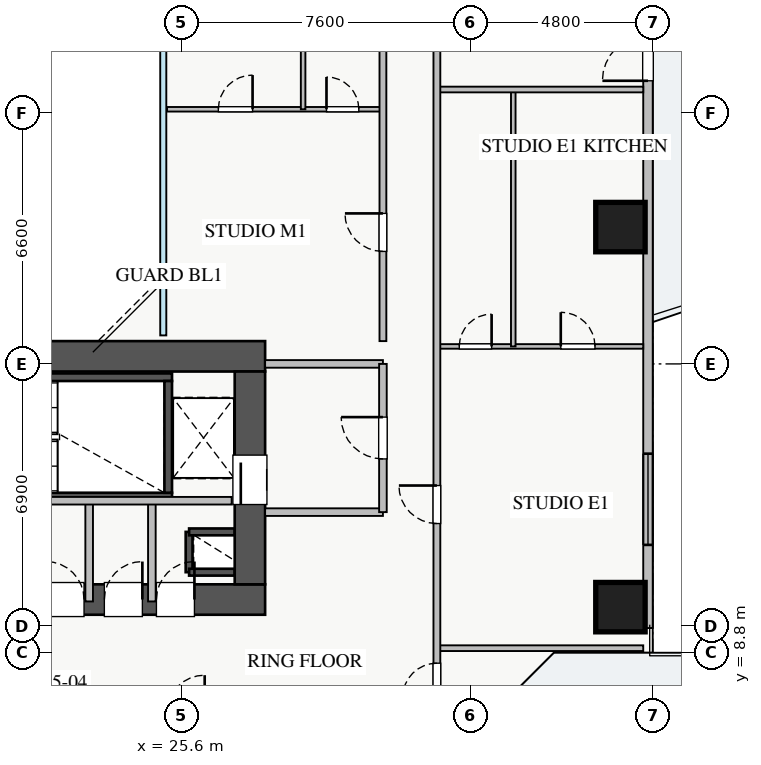
"""IFC4 building model, lengths in metres.
Left out: names, types, materials, properties, quantities, classifications, styles, units other than length and angle.
Written with IfcOpenShell. Run it as: python <this file> out.ifc"""

import sys

from ifc_helpers import new_model, si_unit, direction, frame, frame_2d, origin, origin_2d, place, context, subcontext, project, spatial, rectangle, extrude, source, transform, mapped, element, fill, save


model = new_model("IFC4")
c1 = context("Model", 3, precision=1e-05, world=origin(), true_north=direction((0.0, 1.0)))
c2 = subcontext(c1, "Body", "Model", "MODEL_VIEW")
j1 = project(units=[si_unit("LENGTHUNIT", "METRE"), si_unit("PLANEANGLEUNIT", "RADIAN")], contexts=[c1])
p1 = place(None, origin())
s1 = spatial("IfcSite", under=j1, at=p1, CompositionType="ELEMENT")
p2 = place(p1, origin())
s2 = spatial("IfcBuilding", under=s1, at=p2, CompositionType="ELEMENT")
p3 = place(p2, frame((0.0, 0.0, 73.0)))
s3 = spatial("IfcBuildingStorey", under=s2, at=p3, CompositionType="ELEMENT", Elevation=73.0)
p4 = place(p3, frame((25.8, 10.92, 0.0), z_axis=(0.0, 0.0, 1.0), x_axis=(0.0, 1.0, 0.0)))
e1 = element("IfcWall", 1, at=p4, inside=s3, PredefinedType="SHEAR", context=c2, shape_type="SweptSolid", body=[
    extrude(rectangle(XDim=1.06, YDim=0.18, at=frame_2d((0.53, 0.0))), origin(), (0.0, 0.0, 1.0), 3.07),
])
for number, where, z_axis, x_axis in (
    (2, (25.8, 11.98, 0.0), (0.0, 0.0, 1.0), (1.0, 0.0, 0.0)),
    (3, (25.8, 10.92, 0.0), (0.0, 0.0, 1.0), (1.0, 0.0, 0.0)),
):
    element("IfcWall", number, at=place(p3, frame(where, z_axis=z_axis, x_axis=x_axis)), inside=s3, PredefinedType="SHEAR", context=c2, shape_type="SweptSolid", body=[
        extrude(rectangle(XDim=1.2, YDim=0.18, at=frame_2d((0.6, 0.0))), origin(), (0.0, 0.0, 1.0), 3.07),
    ])
p5 = place(p3, frame((18.2, 12.91, 0.0), z_axis=(0.0, 0.0, 1.0), x_axis=(1.0, 0.0, 0.0)))
e4 = element("IfcWall", 4, at=p5, inside=s3, PredefinedType="SHEAR", context=c2, shape_type="SweptSolid", body=[
    extrude(rectangle(XDim=7.15, YDim=0.2, at=frame_2d((3.575, 0.0))), origin(), (0.0, 0.0, 1.0), 3.25),
])
p6 = place(p5, frame((0.35, 0.0, 0.0)))
e5 = element("IfcOpeningElement", 5, at=p6, cuts=e4, PredefinedType="OPENING", context=c2, shape_type="SweptSolid", body=[
    extrude(rectangle(XDim=1.1, YDim=2.05, at=frame_2d((0.55, 1.025))), frame((0.0, 0.11, 0.0), z_axis=(0.0, -1.0, 0.0), x_axis=(1.0, 0.0, 0.0)), (0.0, 0.0, 1.0), 0.22),
])
p7 = place(p3, frame((18.2, 16.05, 0.0), z_axis=(0.0, 0.0, 1.0), x_axis=(1.0, 0.0, 0.0)))
e6 = element("IfcWall", 6, at=p7, inside=s3, PredefinedType="SHEAR", context=c2, shape_type="SweptSolid", body=[
    extrude(rectangle(XDim=7.15, YDim=0.2, at=frame_2d((3.575, 0.0))), origin(), (0.0, 0.0, 1.0), 3.25),
])
p8 = place(p3, frame((25.25, 13.01, 0.0), z_axis=(0.0, 0.0, 1.0), x_axis=(0.0, 1.0, 0.0)))
e7 = element("IfcWall", 7, at=p8, inside=s3, PredefinedType="SHEAR", context=c2, shape_type="SweptSolid", body=[
    extrude(rectangle(XDim=2.94, YDim=0.2, at=frame_2d((1.47, 0.0))), origin(), (0.0, 0.0, 1.0), 3.25),
])
p9 = place(p3, frame((10.2, 10.2, 0.0), z_axis=(0.0, 0.0, 1.0), x_axis=(1.0, 0.0, 0.0)))
e8 = element("IfcWall", 8, at=p9, inside=s3, PredefinedType="SHEAR", context=c2, shape_type="SweptSolid", body=[
    extrude(rectangle(XDim=17.6, YDim=0.8, at=frame_2d((8.8, 0.0))), origin(), (0.0, 0.0, 1.0), 3.25),
])
p10 = place(p9, frame((1.15, 0.0, 0.0)))
e9 = element("IfcOpeningElement", 9, at=p10, cuts=e8, PredefinedType="OPENING", context=c2, shape_type="SweptSolid", body=[
    extrude(rectangle(XDim=1.1, YDim=2.05, at=frame_2d((0.55, 1.025))), frame((0.0, 0.41, 0.0), z_axis=(0.0, -1.0, 0.0), x_axis=(1.0, 0.0, 0.0)), (0.0, 0.0, 1.0), 0.82),
])
p11 = place(p9, frame((8.3, 0.0, 0.0)))
e10 = element("IfcOpeningElement", 10, at=p11, cuts=e8, PredefinedType="OPENING", context=c2, shape_type="SweptSolid", body=[
    extrude(rectangle(XDim=1.1, YDim=2.05, at=frame_2d((0.55, 1.025))), frame((0.0, 0.41, 0.0), z_axis=(0.0, -1.0, 0.0), x_axis=(1.0, 0.0, 0.0)), (0.0, 0.0, 1.0), 0.82),
])
p12 = place(p9, frame((10.05, 0.0, 0.0)))
e11 = element("IfcOpeningElement", 11, at=p12, cuts=e8, PredefinedType="OPENING", context=c2, shape_type="SweptSolid", body=[
    extrude(rectangle(XDim=1.1, YDim=2.05, at=frame_2d((0.55, 1.025))), frame((0.0, 0.41, 0.0), z_axis=(0.0, -1.0, 0.0), x_axis=(1.0, 0.0, 0.0)), (0.0, 0.0, 1.0), 0.82),
])
p13 = place(p9, frame((14.74, 0.0, 0.0)))
e12 = element("IfcOpeningElement", 12, at=p13, cuts=e8, PredefinedType="OPENING", context=c2, shape_type="SweptSolid", body=[
    extrude(rectangle(XDim=1.0, YDim=2.05, at=frame_2d((0.5, 1.025))), frame((0.0, 0.41, 0.0), z_axis=(0.0, -1.0, 0.0), x_axis=(1.0, 0.0, 0.0)), (0.0, 0.0, 1.0), 0.82),
])
p14 = place(p9, frame((11.835, 0.0, 0.0)))
e13 = element("IfcOpeningElement", 13, at=p14, cuts=e8, PredefinedType="OPENING", context=c2, shape_type="SweptSolid", body=[
    extrude(rectangle(XDim=1.0, YDim=2.05, at=frame_2d((0.5, 1.025))), frame((0.0, 0.41, 0.0), z_axis=(0.0, -1.0, 0.0), x_axis=(1.0, 0.0, 0.0)), (0.0, 0.0, 1.0), 0.82),
])
p15 = place(p9, frame((13.37, 0.0, 0.0)))
e14 = element("IfcOpeningElement", 14, at=p15, cuts=e8, PredefinedType="OPENING", context=c2, shape_type="SweptSolid", body=[
    extrude(rectangle(XDim=1.0, YDim=2.05, at=frame_2d((0.5, 1.025))), frame((0.0, 0.41, 0.0), z_axis=(0.0, -1.0, 0.0), x_axis=(1.0, 0.0, 0.0)), (0.0, 0.0, 1.0), 0.82),
])
p16 = place(p3, frame((10.2, 16.6, 0.0), z_axis=(0.0, 0.0, 1.0), x_axis=(1.0, 0.0, 0.0)))
e15 = element("IfcWall", 15, at=p16, inside=s3, PredefinedType="SHEAR", context=c2, shape_type="SweptSolid", body=[
    extrude(rectangle(XDim=17.6, YDim=0.8, at=frame_2d((8.8, 0.0))), origin(), (0.0, 0.0, 1.0), 3.25),
])
p17 = place(p3, frame((27.4, 10.6, 0.0), z_axis=(0.0, 0.0, 1.0), x_axis=(0.0, 1.0, 0.0)))
e16 = element("IfcWall", 16, at=p17, inside=s3, PredefinedType="SHEAR", context=c2, shape_type="SweptSolid", body=[
    extrude(rectangle(XDim=5.6, YDim=0.8, at=frame_2d((2.8, 0.0))), origin(), (0.0, 0.0, 1.0), 3.25),
])
p18 = place(p17, frame((2.1, 0.0, 0.0)))
e17 = element("IfcOpeningElement", 17, at=p18, cuts=e16, PredefinedType="OPENING", context=c2, shape_type="SweptSolid", body=[
    extrude(rectangle(XDim=1.3, YDim=2.05, at=frame_2d((0.65, 1.025))), frame((0.0, 0.41, 0.0), z_axis=(0.0, -1.0, 0.0), x_axis=(1.0, 0.0, 0.0)), (0.0, 0.0, 1.0), 0.82),
])
m1 = source(origin(), c2, "Body", "SweptSolid", [
    extrude(rectangle(XDim=1.3, YDim=1.3, at=origin_2d()), origin(), (0.0, 0.0, 1.0), 3.25),
])
for number, where, z_axis, x_axis in (
    (18, (37.15, 10.0, 0.0), (0.0, 0.0, 1.0), (1.0, 0.0, 0.0)),
    (19, (37.15, 20.0, 0.0), (0.0, 0.0, 1.0), (1.0, 0.0, 0.0)),
):
    element("IfcColumn", number, at=place(p3, frame(where, z_axis=z_axis, x_axis=x_axis)), inside=s3, PredefinedType="COLUMN", context=c2, shape_type="MappedRepresentation", body=[
        mapped(m1, transform((0.0, 0.0, 0.0), x_axis=(1.0, 0.0, 0.0), y_axis=(0.0, 1.0, 0.0), z_axis=(0.0, 0.0, 1.0), scale=1.0)),
    ])
p19 = place(p3, frame((37.875, 9.45, 0.0), z_axis=(0.0, 0.0, 1.0), x_axis=(0.0, 1.0, 0.0)))
e20 = element("IfcWall", 20, at=p19, inside=s3, PredefinedType="STANDARD", context=c2, shape_type="SweptSolid", body=[
    extrude(rectangle(XDim=27.1, YDim=0.25, at=frame_2d((13.55, 0.0))), origin(), (0.0, 0.0, 1.0), 2.61),
])
p20 = place(p19, frame((14.4, 0.0, 0.0)))
e21 = element("IfcOpeningElement", 21, at=p20, cuts=e20, PredefinedType="OPENING", context=c2, shape_type="SweptSolid", body=[
    extrude(rectangle(XDim=1.2, YDim=2.1, at=frame_2d((0.6, 1.05))), frame((0.0, 0.135, 0.0), z_axis=(0.0, -1.0, 0.0), x_axis=(1.0, 0.0, 0.0)), (0.0, 0.0, 1.0), 0.27),
])
p21 = place(p19, frame((2.188, 0.0, 0.9)))
e22 = element("IfcOpeningElement", 22, at=p21, cuts=e20, PredefinedType="OPENING", context=c2, shape_type="SweptSolid", body=[
    extrude(rectangle(XDim=2.4, YDim=1.48, at=frame_2d((1.2, 0.74))), frame((0.0, 0.135, 0.0), z_axis=(0.0, -1.0, 0.0), x_axis=(1.0, 0.0, 0.0)), (0.0, 0.0, 1.0), 0.27),
])
p22 = place(p19, frame((22.663, 0.0, 0.9)))
e23 = element("IfcOpeningElement", 23, at=p22, cuts=e20, PredefinedType="OPENING", context=c2, shape_type="SweptSolid", body=[
    extrude(rectangle(XDim=2.1, YDim=1.48, at=frame_2d((1.05, 0.74))), frame((0.0, 0.135, 0.0), z_axis=(0.0, -1.0, 0.0), x_axis=(1.0, 0.0, 0.0)), (0.0, 0.0, 1.0), 0.27),
])
p23 = place(p19, frame((17.365, 0.0, 0.9)))
e24 = element("IfcOpeningElement", 24, at=p23, cuts=e20, PredefinedType="OPENING", context=c2, shape_type="SweptSolid", body=[
    extrude(rectangle(XDim=0.9, YDim=1.2, at=frame_2d((0.45, 0.6))), frame((0.0, 0.135, 0.0), z_axis=(0.0, -1.0, 0.0), x_axis=(1.0, 0.0, 0.0)), (0.0, 0.0, 1.0), 0.27),
])
for number, where, z_axis, x_axis in (
    (25, (27.8, 16.4, 0.0), (0.0, 0.0, 1.0), (1.0, 0.0, 0.0)),
    (26, (27.8, 12.5, 0.0), (0.0, 0.0, 1.0), (1.0, 0.0, 0.0)),
):
    element("IfcWall", number, at=place(p3, frame(where, z_axis=z_axis, x_axis=x_axis)), inside=s3, PredefinedType="PARTITIONING", context=c2, shape_type="SweptSolid", body=[
        extrude(rectangle(XDim=3.1, YDim=0.2, at=frame_2d((1.55, 0.0))), origin(), (0.0, 0.0, 1.0), 3.07),
    ])
p24 = place(p3, frame((30.9, 12.5, 0.0), z_axis=(0.0, 0.0, 1.0), x_axis=(0.0, 1.0, 0.0)))
e27 = element("IfcWall", 27, at=p24, inside=s3, PredefinedType="PARTITIONING", context=c2, shape_type="SweptSolid", body=[
    extrude(rectangle(XDim=3.9, YDim=0.2, at=frame_2d((1.95, 0.0))), origin(), (0.0, 0.0, 1.0), 3.07),
])
p25 = place(p24, frame((1.4, 0.0, 0.0)))
e28 = element("IfcOpeningElement", 28, at=p25, cuts=e27, PredefinedType="OPENING", context=c2, shape_type="SweptSolid", body=[
    extrude(rectangle(XDim=1.1, YDim=2.05, at=frame_2d((0.55, 1.025))), frame((0.0, 0.11, 0.0), z_axis=(0.0, -1.0, 0.0), x_axis=(1.0, 0.0, 0.0)), (0.0, 0.0, 1.0), 0.22),
])
for number, where, z_axis, x_axis in (
    (29, (24.82, 10.15, 0.0), (0.0, 0.0, 1.0), (0.0, 1.0, 0.0)),
    (30, (23.17, 10.15, 0.0), (0.0, 0.0, 1.0), (0.0, 1.0, 0.0)),
):
    element("IfcWall", number, at=place(p3, frame(where, z_axis=z_axis, x_axis=x_axis)), inside=s3, PredefinedType="PARTITIONING", context=c2, shape_type="SweptSolid", body=[
        extrude(rectangle(XDim=2.65, YDim=0.2, at=frame_2d((1.325, 0.0))), origin(), (0.0, 0.0, 1.0), 3.07),
    ])
p26 = place(p3, frame((21.75, 12.8, 0.0), z_axis=(0.0, 0.0, 1.0), x_axis=(1.0, 0.0, 0.0)))
e31 = element("IfcWall", 31, at=p26, inside=s3, PredefinedType="PARTITIONING", context=c2, shape_type="SweptSolid", body=[
    extrude(rectangle(XDim=5.17, YDim=0.2, at=frame_2d((2.585, 0.0))), origin(), (0.0, 0.0, 1.0), 3.07),
])
p27 = place(p3, frame((32.32, 8.92, 0.0), z_axis=(0.0, 0.0, 1.0), x_axis=(1.0, 0.0, 0.0)))
e32 = element("IfcWall", 32, at=p27, inside=s3, PredefinedType="PARTITIONING", context=c2, shape_type="SweptSolid", body=[
    extrude(rectangle(XDim=5.43, YDim=0.15, at=frame_2d((2.715, 0.0))), origin(), (0.0, 0.0, 1.0), 3.07),
])
p28 = place(p3, frame((32.32, 16.86, 0.0), z_axis=(0.0, 0.0, 1.0), x_axis=(1.0, 0.0, 0.0)))
e33 = element("IfcWall", 33, at=p28, inside=s3, PredefinedType="PLUMBINGWALL", context=c2, shape_type="SweptSolid", body=[
    extrude(rectangle(XDim=5.43, YDim=0.12, at=frame_2d((2.715, 0.0))), origin(), (0.0, 0.0, 1.0), 3.07),
])
p29 = place(p28, frame((0.59, 0.0, 0.0)))
e34 = element("IfcOpeningElement", 34, at=p29, cuts=e33, PredefinedType="OPENING", context=c2, shape_type="SweptSolid", body=[
    extrude(rectangle(XDim=0.85, YDim=2.05, at=frame_2d((0.425, 1.025))), frame((0.0, 0.07, 0.0), z_axis=(0.0, -1.0, 0.0), x_axis=(1.0, 0.0, 0.0)), (0.0, 0.0, 1.0), 0.14),
])
p30 = place(p28, frame((3.26, 0.0, 0.0)))
e35 = element("IfcOpeningElement", 35, at=p30, cuts=e33, PredefinedType="OPENING", context=c2, shape_type="SweptSolid", body=[
    extrude(rectangle(XDim=0.9, YDim=2.05, at=frame_2d((0.45, 1.025))), frame((0.0, 0.07, 0.0), z_axis=(0.0, -1.0, 0.0), x_axis=(1.0, 0.0, 0.0)), (0.0, 0.0, 1.0), 0.14),
])
p31 = place(p3, frame((34.33, 16.86, 0.0), z_axis=(0.0, 0.0, 1.0), x_axis=(0.0, 1.0, 0.0)))
e36 = element("IfcWall", 36, at=p31, inside=s3, PredefinedType="PLUMBINGWALL", context=c2, shape_type="SweptSolid", body=[
    extrude(rectangle(XDim=6.76, YDim=0.12, at=frame_2d((3.38, 0.0))), origin(), (0.0, 0.0, 1.0), 3.07),
])
p32 = place(p3, frame((32.32, 23.62, 0.0), z_axis=(0.0, 0.0, 1.0), x_axis=(1.0, 0.0, 0.0)))
e37 = element("IfcWall", 37, at=p32, inside=s3, PredefinedType="PARTITIONING", context=c2, shape_type="SweptSolid", body=[
    extrude(rectangle(XDim=5.43, YDim=0.15, at=frame_2d((2.715, 0.0))), origin(), (0.0, 0.0, 1.0), 3.07),
])
p33 = place(p3, frame((32.32, 7.21, 0.0), z_axis=(0.0, 0.0, 1.0), x_axis=(0.0, 1.0, 0.0)))
e38 = element("IfcWall", 38, at=p33, inside=s3, PredefinedType="PARTITIONING", context=c2, shape_type="SweptSolid", body=[
    extrude(rectangle(XDim=31.23, YDim=0.18, at=frame_2d((15.615, 0.0))), origin(), (0.0, 0.0, 1.0), 2.771),
])
p34 = place(p33, frame((30.09, 0.0, 0.0)))
e39 = element("IfcOpeningElement", 39, at=p34, cuts=e38, PredefinedType="OPENING", context=c2, shape_type="SweptSolid", body=[
    extrude(rectangle(XDim=0.9, YDim=2.05, at=frame_2d((0.45, 1.025))), frame((0.0, 0.1, 0.0), z_axis=(0.0, -1.0, 0.0), x_axis=(1.0, 0.0, 0.0)), (0.0, 0.0, 1.0), 0.2),
])
p35 = place(p33, frame((0.415, 0.0, 0.0)))
e40 = element("IfcOpeningElement", 40, at=p35, cuts=e38, PredefinedType="OPENING", context=c2, shape_type="SweptSolid", body=[
    extrude(rectangle(XDim=0.9, YDim=2.05, at=frame_2d((0.45, 1.025))), frame((0.0, 0.1, 0.0), z_axis=(0.0, -1.0, 0.0), x_axis=(1.0, 0.0, 0.0)), (0.0, 0.0, 1.0), 0.2),
])
p36 = place(p33, frame((4.99, 0.0, 0.0)))
e41 = element("IfcOpeningElement", 41, at=p36, cuts=e38, PredefinedType="OPENING", context=c2, shape_type="SweptSolid", body=[
    extrude(rectangle(XDim=1.0, YDim=2.05, at=frame_2d((0.5, 1.025))), frame((0.0, 0.1, 0.0), z_axis=(0.0, -1.0, 0.0), x_axis=(1.0, 0.0, 0.0)), (0.0, 0.0, 1.0), 0.2),
])
p37 = place(p33, frame((19.355, 0.0, 0.0)))
e42 = element("IfcOpeningElement", 42, at=p37, cuts=e38, PredefinedType="OPENING", context=c2, shape_type="SweptSolid", body=[
    extrude(rectangle(XDim=1.0, YDim=2.05, at=frame_2d((0.5, 1.025))), frame((0.0, 0.1, 0.0), z_axis=(0.0, -1.0, 0.0), x_axis=(1.0, 0.0, 0.0)), (0.0, 0.0, 1.0), 0.2),
])
p38 = place(p3, frame((25.22, 23.1, 0.0), z_axis=(0.0, 0.0, 1.0), x_axis=(1.0, 0.0, 0.0)))
e43 = element("IfcWall", 43, at=p38, inside=s3, PredefinedType="PLUMBINGWALL", context=c2, shape_type="SweptSolid", body=[
    extrude(rectangle(XDim=5.68, YDim=0.12, at=frame_2d((2.84, 0.0))), origin(), (0.0, 0.0, 1.0), 3.07),
])
p39 = place(p38, frame((1.35, 0.0, 0.0)))
e44 = element("IfcOpeningElement", 44, at=p39, cuts=e43, PredefinedType="OPENING", context=c2, shape_type="SweptSolid", body=[
    extrude(rectangle(XDim=0.9, YDim=2.05, at=frame_2d((0.45, 1.025))), frame((0.0, 0.07, 0.0), z_axis=(0.0, -1.0, 0.0), x_axis=(1.0, 0.0, 0.0)), (0.0, 0.0, 1.0), 0.14),
])
p40 = place(p38, frame((4.195, 0.0, 0.0)))
e45 = element("IfcOpeningElement", 45, at=p40, cuts=e43, PredefinedType="OPENING", context=c2, shape_type="SweptSolid", body=[
    extrude(rectangle(XDim=0.85, YDim=2.05, at=frame_2d((0.425, 1.025))), frame((0.0, 0.07, 0.0), z_axis=(0.0, -1.0, 0.0), x_axis=(1.0, 0.0, 0.0)), (0.0, 0.0, 1.0), 0.14),
])
p41 = place(p3, frame((28.8, 23.1, 0.0), z_axis=(0.0, 0.0, 1.0), x_axis=(0.0, 1.0, 0.0)))
e46 = element("IfcWall", 46, at=p41, inside=s3, PredefinedType="PLUMBINGWALL", context=c2, shape_type="SweptSolid", body=[
    extrude(rectangle(XDim=5.9, YDim=0.12, at=frame_2d((2.95, 0.0))), origin(), (0.0, 0.0, 1.0), 3.07),
])
p42 = place(p3, frame((30.9, 17.0, 0.0), z_axis=(0.0, 0.0, 1.0), x_axis=(0.0, 1.0, 0.0)))
e47 = element("IfcWall", 47, at=p42, inside=s3, PredefinedType="PARTITIONING", context=c2, shape_type="SweptSolid", body=[
    extrude(rectangle(XDim=12.0, YDim=0.18, at=frame_2d((6.0, 0.0))), origin(), (0.0, 0.0, 1.0), 3.07),
])
p43 = place(p42, frame((2.36, 0.0, 0.0)))
e48 = element("IfcOpeningElement", 48, at=p43, cuts=e47, PredefinedType="OPENING", context=c2, shape_type="SweptSolid", body=[
    extrude(rectangle(XDim=1.0, YDim=2.05, at=frame_2d((0.5, 1.025))), frame((0.0, 0.1, 0.0), z_axis=(0.0, -1.0, 0.0), x_axis=(1.0, 0.0, 0.0)), (0.0, 0.0, 1.0), 0.2),
])
m2 = source(origin(), c2, "Body", "SweptSolid", [
    extrude(rectangle(XDim=1.2, YDim=2.1, at=frame_2d((0.6, 1.05))), frame((0.0, 0.025, 0.0), z_axis=(0.0, -1.0, 0.0), x_axis=(1.0, 0.0, 0.0)), (0.0, 0.0, 1.0), 0.05),
])
p44 = place(p20, origin())
e49 = element("IfcDoor", 49, at=p44, inside=s3, OperationType="SINGLE_SWING_LEFT", PredefinedType="DOOR", context=c2, shape_type="MappedRepresentation", body=[
    mapped(m2, transform((0.0, 0.0, 0.0), x_axis=(1.0, 0.0, 0.0), y_axis=(0.0, 1.0, 0.0), z_axis=(0.0, 0.0, 1.0), scale=1.0)),
])
fill(e21, e49)
m3 = source(origin(), c2, "Body", "SweptSolid", [
    extrude(rectangle(XDim=2.4, YDim=1.48, at=frame_2d((1.2, 0.74))), frame((0.0, 0.03, 0.0), z_axis=(0.0, -1.0, 0.0), x_axis=(1.0, 0.0, 0.0)), (0.0, 0.0, 1.0), 0.06),
])
p45 = place(p21, origin())
e50 = element("IfcWindow", 50, at=p45, inside=s3, PartitioningType="TRIPLE_PANEL_VERTICAL", PredefinedType="WINDOW", context=c2, shape_type="MappedRepresentation", body=[
    mapped(m3, transform((0.0, 0.0, 0.0), x_axis=(1.0, 0.0, 0.0), y_axis=(0.0, 1.0, 0.0), z_axis=(0.0, 0.0, 1.0), scale=1.0)),
])
fill(e22, e50)
m4 = source(origin(), c2, "Body", "SweptSolid", [
    extrude(rectangle(XDim=1.3, YDim=2.05, at=frame_2d((0.65, 1.025))), frame((0.0, 0.025, 0.0), z_axis=(0.0, -1.0, 0.0), x_axis=(1.0, 0.0, 0.0)), (0.0, 0.0, 1.0), 0.05),
])
p46 = place(p18, origin())
e51 = element("IfcDoor", 51, at=p46, inside=s3, OperationType="SLIDING_TO_RIGHT", PredefinedType="DOOR", context=c2, shape_type="MappedRepresentation", body=[
    mapped(m4, transform((0.0, 0.0, 0.0), x_axis=(1.0, 0.0, 0.0), y_axis=(0.0, 1.0, 0.0), z_axis=(0.0, 0.0, 1.0), scale=1.0)),
])
fill(e17, e51)
m5 = source(origin(), c2, "Body", "SweptSolid", [
    extrude(rectangle(XDim=1.0, YDim=2.05, at=frame_2d((0.5, 1.025))), frame((0.0, 0.025, 0.0), z_axis=(0.0, -1.0, 0.0), x_axis=(1.0, 0.0, 0.0)), (0.0, 0.0, 1.0), 0.05),
])
p47 = place(p13, origin())
e52 = element("IfcDoor", 52, at=p47, inside=s3, OperationType="SINGLE_SWING_RIGHT", PredefinedType="DOOR", context=c2, shape_type="MappedRepresentation", body=[
    mapped(m5, transform((0.0, 0.0, 0.0), x_axis=(1.0, 0.0, 0.0), y_axis=(0.0, 1.0, 0.0), z_axis=(0.0, 0.0, 1.0), scale=1.0)),
])
fill(e12, e52)
p48 = place(p14, origin())
e53 = element("IfcDoor", 53, at=p48, inside=s3, OperationType="SINGLE_SWING_LEFT", PredefinedType="DOOR", context=c2, shape_type="MappedRepresentation", body=[
    mapped(m5, transform((0.0, 0.0, 0.0), x_axis=(1.0, 0.0, 0.0), y_axis=(0.0, 1.0, 0.0), z_axis=(0.0, 0.0, 1.0), scale=1.0)),
])
fill(e13, e53)
p49 = place(p15, origin())
e54 = element("IfcDoor", 54, at=p49, inside=s3, OperationType="SINGLE_SWING_RIGHT", PredefinedType="DOOR", context=c2, shape_type="MappedRepresentation", body=[
    mapped(m5, transform((0.0, 0.0, 0.0), x_axis=(1.0, 0.0, 0.0), y_axis=(0.0, 1.0, 0.0), z_axis=(0.0, 0.0, 1.0), scale=1.0)),
])
fill(e14, e54)
m6 = source(origin(), c2, "Body", "SweptSolid", [
    extrude(rectangle(XDim=1.1, YDim=2.05, at=frame_2d((0.55, 1.025))), frame((0.0, 0.025, 0.0), z_axis=(0.0, -1.0, 0.0), x_axis=(1.0, 0.0, 0.0)), (0.0, 0.0, 1.0), 0.05),
])
p50 = place(p25, origin())
e55 = element("IfcDoor", 55, at=p50, inside=s3, OperationType="SINGLE_SWING_RIGHT", PredefinedType="DOOR", context=c2, shape_type="MappedRepresentation", body=[
    mapped(m6, transform((0.0, 0.0, 0.0), x_axis=(1.0, 0.0, 0.0), y_axis=(0.0, 1.0, 0.0), z_axis=(0.0, 0.0, 1.0), scale=1.0)),
])
fill(e28, e55)
m7 = source(origin(), c2, "Body", "SweptSolid", [
    extrude(rectangle(XDim=0.85, YDim=2.05, at=frame_2d((0.425, 1.025))), frame((0.0, 0.025, 0.0), z_axis=(0.0, -1.0, 0.0), x_axis=(1.0, 0.0, 0.0)), (0.0, 0.0, 1.0), 0.05),
])
p51 = place(p29, origin())
e56 = element("IfcDoor", 56, at=p51, inside=s3, OperationType="SINGLE_SWING_RIGHT", PredefinedType="DOOR", context=c2, shape_type="MappedRepresentation", body=[
    mapped(m7, transform((0.0, 0.0, 0.0), x_axis=(1.0, 0.0, 0.0), y_axis=(0.0, 1.0, 0.0), z_axis=(0.0, 0.0, 1.0), scale=1.0)),
])
fill(e34, e56)
m8 = source(origin(), c2, "Body", "SweptSolid", [
    extrude(rectangle(XDim=0.9, YDim=2.05, at=frame_2d((0.45, 1.025))), frame((0.0, 0.025, 0.0), z_axis=(0.0, -1.0, 0.0), x_axis=(1.0, 0.0, 0.0)), (0.0, 0.0, 1.0), 0.05),
])
p52 = place(p30, origin())
e57 = element("IfcDoor", 57, at=p52, inside=s3, OperationType="SINGLE_SWING_LEFT", PredefinedType="DOOR", context=c2, shape_type="MappedRepresentation", body=[
    mapped(m8, transform((0.0, 0.0, 0.0), x_axis=(1.0, 0.0, 0.0), y_axis=(0.0, 1.0, 0.0), z_axis=(0.0, 0.0, 1.0), scale=1.0)),
])
fill(e35, e57)
p53 = place(p35, origin())
e58 = element("IfcDoor", 58, at=p53, inside=s3, OperationType="SINGLE_SWING_LEFT", PredefinedType="DOOR", context=c2, shape_type="MappedRepresentation", body=[
    mapped(m8, transform((0.0, 0.0, 0.0), x_axis=(1.0, 0.0, 0.0), y_axis=(0.0, 1.0, 0.0), z_axis=(0.0, 0.0, 1.0), scale=1.0)),
])
fill(e40, e58)
p54 = place(p36, origin())
e59 = element("IfcDoor", 59, at=p54, inside=s3, OperationType="SINGLE_SWING_RIGHT", PredefinedType="DOOR", context=c2, shape_type="MappedRepresentation", body=[
    mapped(m5, transform((0.0, 0.0, 0.0), x_axis=(1.0, 0.0, 0.0), y_axis=(0.0, 1.0, 0.0), z_axis=(0.0, 0.0, 1.0), scale=1.0)),
])
fill(e41, e59)
p55 = place(p39, origin())
e60 = element("IfcDoor", 60, at=p55, inside=s3, OperationType="SINGLE_SWING_RIGHT", PredefinedType="DOOR", context=c2, shape_type="MappedRepresentation", body=[
    mapped(m8, transform((0.0, 0.0, 0.0), x_axis=(1.0, 0.0, 0.0), y_axis=(0.0, 1.0, 0.0), z_axis=(0.0, 0.0, 1.0), scale=1.0)),
])
fill(e44, e60)
p56 = place(p40, origin())
e61 = element("IfcDoor", 61, at=p56, inside=s3, OperationType="SINGLE_SWING_LEFT", PredefinedType="DOOR", context=c2, shape_type="MappedRepresentation", body=[
    mapped(m7, transform((0.0, 0.0, 0.0), x_axis=(1.0, 0.0, 0.0), y_axis=(0.0, 1.0, 0.0), z_axis=(0.0, 0.0, 1.0), scale=1.0)),
])
fill(e45, e61)
p57 = place(p43, origin())
e62 = element("IfcDoor", 62, at=p57, inside=s3, OperationType="SINGLE_SWING_RIGHT", PredefinedType="DOOR", context=c2, shape_type="MappedRepresentation", body=[
    mapped(m5, transform((0.0, 0.0, 0.0), x_axis=(1.0, 0.0, 0.0), y_axis=(0.0, 1.0, 0.0), z_axis=(0.0, 0.0, 1.0), scale=1.0)),
])
fill(e48, e62)
save(model, sys.argv[1])
